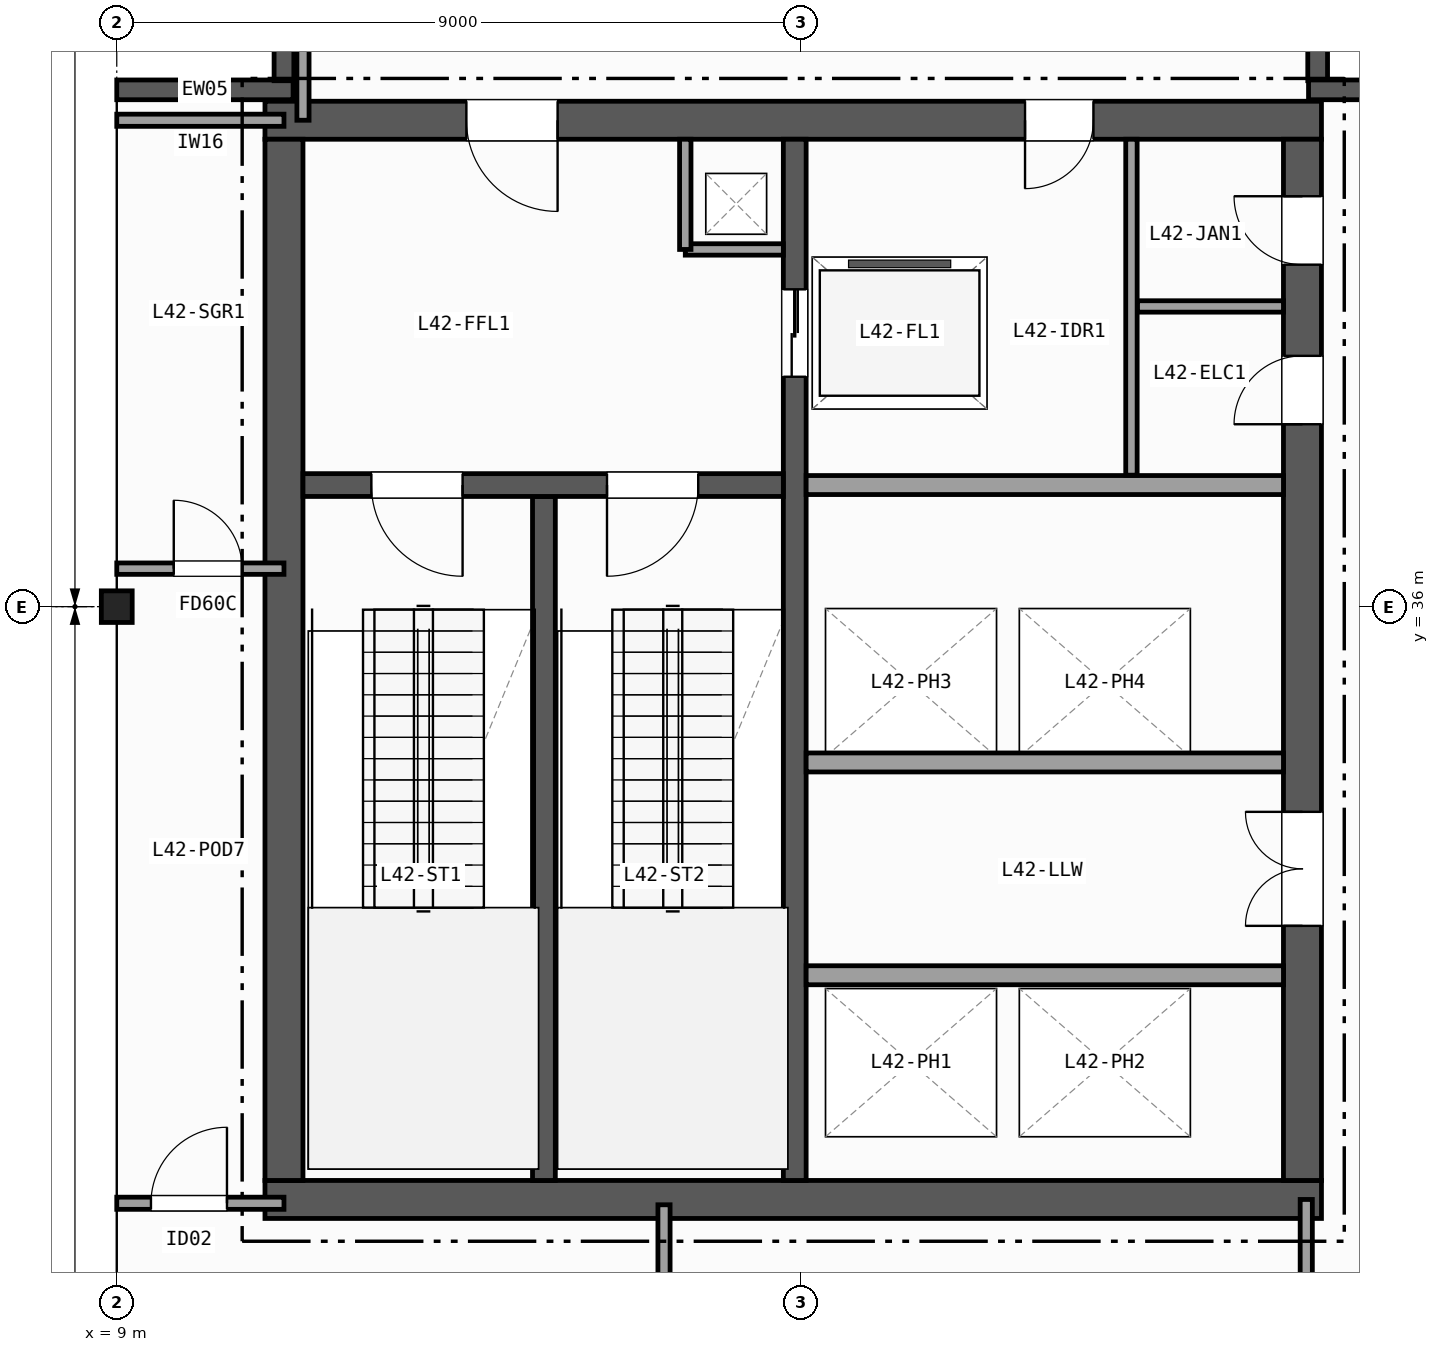
"""IFC4 building model, lengths in metres.
Left out: names, types, materials, properties, quantities, classifications, styles, units other than length and angle.
Written with IfcOpenShell. Run it as: python <this file> out.ifc"""

import sys

from ifc_helpers import new_model, si_unit, direction, frame, frame_2d, origin, origin_2d, place, context, subcontext, project, spatial, rectangle, i_section, extrude, element, fill, save


model = new_model("IFC4")
c1 = context("Model", 3, precision=1e-05, world=origin(), true_north=direction((0.0, 1.0)))
c2 = subcontext(c1, "Body", "Model", "MODEL_VIEW")
j1 = project(units=[si_unit("LENGTHUNIT", "METRE"), si_unit("PLANEANGLEUNIT", "RADIAN")], contexts=[c1])
p1 = place(None, origin())
s1 = spatial("IfcSite", under=j1, at=p1, CompositionType="ELEMENT")
p2 = place(p1, origin())
s2 = spatial("IfcBuilding", under=s1, at=p2, CompositionType="ELEMENT")
p3 = place(p2, frame((0.0, 0.0, 169.2)))
s3 = spatial("IfcBuildingStorey", under=s2, at=p3, CompositionType="ELEMENT", Elevation=169.2)
p4 = place(p3, frame((9.0, 36.0, 0.0), z_axis=(0.0, 0.0, 1.0), x_axis=(1.0, 0.0, 0.0)))
e1 = element("IfcColumn", 1, at=p4, inside=s3, PredefinedType="COLUMN", context=c2, shape_type="SweptSolid", body=[
    extrude(i_section(OverallWidth=0.406, OverallDepth=0.416, WebThickness=0.03, FlangeThickness=0.048, FilletRadius=0.015, at=origin_2d()), origin(), (0.0, 0.0, 1.0), 5.0),
])
p5 = place(p3, frame((9.0, 42.8, 0.0), z_axis=(0.0, 0.0, 1.0), x_axis=(1.0, 0.0, 0.0)))
e2 = element("IfcWall", 2, at=p5, inside=s3, PredefinedType="SOLIDWALL", context=c2, shape_type="SweptSolid", body=[
    extrude(rectangle(XDim=2.32, YDim=0.26, at=frame_2d((1.16, 0.0))), origin(), (0.0, 0.0, 1.0), 4.72),
])
for number, where, z_axis, x_axis in (
    (3, (11.2, 42.92, 0.0), (0.0, 0.0, 1.0), (0.0, 1.0, 0.0)),
    (4, (24.8, 45.0, 0.0), (0.0, 0.0, 1.0), (0.0, -1.0, 0.0)),
):
    element("IfcWall", number, at=place(p3, frame(where, z_axis=z_axis, x_axis=x_axis)), inside=s3, PredefinedType="SOLIDWALL", context=c2, shape_type="SweptSolid", body=[
        extrude(rectangle(XDim=2.08, YDim=0.26, at=frame_2d((1.04, 0.0))), origin(), (0.0, 0.0, 1.0), 4.72),
    ])
p6 = place(p3, frame((24.68, 42.8, 0.0), z_axis=(0.0, 0.0, 1.0), x_axis=(1.0, 0.0, 0.0)))
e5 = element("IfcWall", 5, at=p6, inside=s3, PredefinedType="SOLIDWALL", context=c2, shape_type="SweptSolid", body=[
    extrude(rectangle(XDim=2.32, YDim=0.26, at=frame_2d((1.16, 0.0))), origin(), (0.0, 0.0, 1.0), 4.72),
])
p7 = place(p3, frame((10.95, 28.2, 0.0), z_axis=(0.0, 0.0, 1.0), x_axis=(1.0, 0.0, 0.0)))
e6 = element("IfcWall", 6, at=p7, inside=s3, PredefinedType="SHEAR", context=c2, shape_type="SweptSolid", body=[
    extrude(rectangle(XDim=13.9, YDim=0.5, at=frame_2d((6.95, 0.0))), origin(), (0.0, 0.0, 1.0), 4.72),
])
p8 = place(p3, frame((24.85, 42.4, 0.0), z_axis=(0.0, 0.0, 1.0), x_axis=(-1.0, 0.0, 0.0)))
e7 = element("IfcWall", 7, at=p8, inside=s3, PredefinedType="SHEAR", context=c2, shape_type="SweptSolid", body=[
    extrude(rectangle(XDim=13.9, YDim=0.5, at=frame_2d((6.95, 0.0))), origin(), (0.0, 0.0, 1.0), 4.72),
])
p9 = place(p8, frame((10.05, 0.0, 0.0)))
e8 = element("IfcOpeningElement", 8, at=p9, cuts=e7, PredefinedType="OPENING", context=c2, shape_type="SweptSolid", body=[
    extrude(rectangle(XDim=1.2, YDim=2.15, at=frame_2d((0.6, 1.075))), frame((0.0, 0.26, 0.0), z_axis=(0.0, -1.0, 0.0), x_axis=(1.0, 0.0, 0.0)), (0.0, 0.0, 1.0), 0.52),
])
p10 = place(p8, frame((3.0, 0.0, 0.0)))
e9 = element("IfcOpeningElement", 9, at=p10, cuts=e7, PredefinedType="OPENING", context=c2, shape_type="SweptSolid", body=[
    extrude(rectangle(XDim=0.9, YDim=2.1, at=frame_2d((0.45, 1.05))), frame((0.0, 0.26, 0.0), z_axis=(0.0, -1.0, 0.0), x_axis=(1.0, 0.0, 0.0)), (0.0, 0.0, 1.0), 0.52),
])
p11 = place(p3, frame((11.2, 42.15, 0.0), z_axis=(0.0, 0.0, 1.0), x_axis=(0.0, -1.0, 0.0)))
e10 = element("IfcWall", 10, at=p11, inside=s3, PredefinedType="SHEAR", context=c2, shape_type="SweptSolid", body=[
    extrude(rectangle(XDim=13.7, YDim=0.5, at=frame_2d((6.85, 0.0))), origin(), (0.0, 0.0, 1.0), 4.72),
])
p12 = place(p3, frame((24.6, 28.45, 0.0), z_axis=(0.0, 0.0, 1.0), x_axis=(0.0, 1.0, 0.0)))
e11 = element("IfcWall", 11, at=p12, inside=s3, PredefinedType="SHEAR", context=c2, shape_type="SweptSolid", body=[
    extrude(rectangle(XDim=13.7, YDim=0.5, at=frame_2d((6.85, 0.0))), origin(), (0.0, 0.0, 1.0), 4.72),
])
p13 = place(p12, frame((3.35, 0.0, 0.0)))
e12 = element("IfcOpeningElement", 12, at=p13, cuts=e11, PredefinedType="OPENING", context=c2, shape_type="SweptSolid", body=[
    extrude(rectangle(XDim=1.5, YDim=2.2, at=frame_2d((0.75, 1.1))), frame((0.0, 0.26, 0.0), z_axis=(0.0, -1.0, 0.0), x_axis=(1.0, 0.0, 0.0)), (0.0, 0.0, 1.0), 0.52),
])
p14 = place(p12, frame((9.95, 0.0, 0.0)))
e13 = element("IfcOpeningElement", 13, at=p14, cuts=e11, PredefinedType="OPENING", context=c2, shape_type="SweptSolid", body=[
    extrude(rectangle(XDim=0.9, YDim=2.1, at=frame_2d((0.45, 1.05))), frame((0.0, 0.26, 0.0), z_axis=(0.0, -1.0, 0.0), x_axis=(1.0, 0.0, 0.0)), (0.0, 0.0, 1.0), 0.52),
])
p15 = place(p12, frame((12.05, 0.0, 0.0)))
e14 = element("IfcOpeningElement", 14, at=p15, cuts=e11, PredefinedType="OPENING", context=c2, shape_type="SweptSolid", body=[
    extrude(rectangle(XDim=0.9, YDim=2.1, at=frame_2d((0.45, 1.05))), frame((0.0, 0.26, 0.0), z_axis=(0.0, -1.0, 0.0), x_axis=(1.0, 0.0, 0.0)), (0.0, 0.0, 1.0), 0.52),
])
p16 = place(p3, frame((14.62, 28.45, 0.0), z_axis=(0.0, 0.0, 1.0), x_axis=(0.0, 1.0, 0.0)))
e15 = element("IfcWall", 15, at=p16, inside=s3, PredefinedType="SHEAR", context=c2, shape_type="SweptSolid", body=[
    extrude(rectangle(XDim=9.0, YDim=0.3, at=frame_2d((4.5, 0.0))), origin(), (0.0, 0.0, 1.0), 4.72),
])
p17 = place(p3, frame((17.92, 42.15, 0.0), z_axis=(0.0, 0.0, 1.0), x_axis=(0.0, -1.0, 0.0)))
e16 = element("IfcWall", 16, at=p17, inside=s3, PredefinedType="SHEAR", context=c2, shape_type="SweptSolid", body=[
    extrude(rectangle(XDim=13.7, YDim=0.3, at=frame_2d((6.85, 0.0))), origin(), (0.0, 0.0, 1.0), 4.72),
])
p18 = place(p17, frame((1.975, 0.0, 0.0)))
e17 = element("IfcOpeningElement", 17, at=p18, cuts=e16, PredefinedType="OPENING", context=c2, shape_type="SweptSolid", body=[
    extrude(rectangle(XDim=1.15, YDim=2.15, at=frame_2d((0.575, 1.075))), frame((0.0, 0.16, 0.0), z_axis=(0.0, -1.0, 0.0), x_axis=(1.0, 0.0, 0.0)), (0.0, 0.0, 1.0), 0.32),
])
p19 = place(p3, frame((17.77, 37.6, 0.0), z_axis=(0.0, 0.0, 1.0), x_axis=(-1.0, 0.0, 0.0)))
e18 = element("IfcWall", 18, at=p19, inside=s3, PredefinedType="SHEAR", context=c2, shape_type="SweptSolid", body=[
    extrude(rectangle(XDim=6.32, YDim=0.3, at=frame_2d((3.16, 0.0))), origin(), (0.0, 0.0, 1.0), 4.72),
])
p20 = place(p19, frame((4.22, 0.0, 0.0)))
e19 = element("IfcOpeningElement", 19, at=p20, cuts=e18, PredefinedType="OPENING", context=c2, shape_type="SweptSolid", body=[
    extrude(rectangle(XDim=1.2, YDim=2.15, at=frame_2d((0.6, 1.075))), frame((0.0, 0.16, 0.0), z_axis=(0.0, -1.0, 0.0), x_axis=(1.0, 0.0, 0.0)), (0.0, 0.0, 1.0), 0.32),
])
p21 = place(p19, frame((1.12, 0.0, 0.0)))
e20 = element("IfcOpeningElement", 20, at=p21, cuts=e18, PredefinedType="OPENING", context=c2, shape_type="SweptSolid", body=[
    extrude(rectangle(XDim=1.2, YDim=2.15, at=frame_2d((0.6, 1.075))), frame((0.0, 0.16, 0.0), z_axis=(0.0, -1.0, 0.0), x_axis=(1.0, 0.0, 0.0)), (0.0, 0.0, 1.0), 0.32),
])
p22 = place(p3, frame((16.48, 40.7, 0.0), z_axis=(0.0, 0.0, 1.0), x_axis=(1.0, 0.0, 0.0)))
e21 = element("IfcWall", 21, at=p22, inside=s3, PredefinedType="PARTITIONING", context=c2, shape_type="SweptSolid", body=[
    extrude(rectangle(XDim=1.29, YDim=0.15, at=frame_2d((0.645, 0.0))), origin(), (0.0, 0.0, 1.0), 4.72),
])
p23 = place(p3, frame((16.48, 40.7, 0.0), z_axis=(0.0, 0.0, 1.0), x_axis=(0.0, 1.0, 0.0)))
e22 = element("IfcWall", 22, at=p23, inside=s3, PredefinedType="PARTITIONING", context=c2, shape_type="SweptSolid", body=[
    extrude(rectangle(XDim=1.45, YDim=0.15, at=frame_2d((0.725, 0.0))), origin(), (0.0, 0.0, 1.0), 4.72),
])
for number, where, z_axis, x_axis in (
    (23, (18.07, 37.6, 0.0), (0.0, 0.0, 1.0), (1.0, 0.0, 0.0)),
    (24, (18.07, 31.15, 0.0), (0.0, 0.0, 1.0), (1.0, 0.0, 0.0)),
    (25, (24.35, 33.95, 0.0), (0.0, 0.0, 1.0), (-1.0, 0.0, 0.0)),
):
    element("IfcWall", number, at=place(p3, frame(where, z_axis=z_axis, x_axis=x_axis)), inside=s3, PredefinedType="PARTITIONING", context=c2, shape_type="SweptSolid", body=[
        extrude(rectangle(XDim=6.28, YDim=0.25, at=frame_2d((3.14, 0.0))), origin(), (0.0, 0.0, 1.0), 4.72),
    ])
p24 = place(p3, frame((22.35, 37.73, 0.0), z_axis=(0.0, 0.0, 1.0), x_axis=(0.0, 1.0, 0.0)))
e26 = element("IfcWall", 26, at=p24, inside=s3, PredefinedType="PARTITIONING", context=c2, shape_type="SweptSolid", body=[
    extrude(rectangle(XDim=4.42, YDim=0.15, at=frame_2d((2.21, 0.0))), origin(), (0.0, 0.0, 1.0), 4.72),
])
p25 = place(p3, frame((22.43, 39.95, 0.0), z_axis=(0.0, 0.0, 1.0), x_axis=(1.0, 0.0, 0.0)))
e27 = element("IfcWall", 27, at=p25, inside=s3, PredefinedType="PARTITIONING", context=c2, shape_type="SweptSolid", body=[
    extrude(rectangle(XDim=1.92, YDim=0.15, at=frame_2d((0.96, 0.0))), origin(), (0.0, 0.0, 1.0), 4.72),
])
p26 = place(p3, frame((9.0, 28.15, 0.0), z_axis=(0.0, 0.0, 1.0), x_axis=(1.0, 0.0, 0.0)))
e28 = element("IfcWall", 28, at=p26, inside=s3, PredefinedType="PARTITIONING", context=c2, shape_type="SweptSolid", body=[
    extrude(rectangle(XDim=2.2, YDim=0.16, at=frame_2d((1.1, 0.0))), origin(), (0.0, 0.0, 1.0), 3.934),
])
p27 = place(p26, frame((0.45, 0.0, 0.0)))
e29 = element("IfcOpeningElement", 29, at=p27, cuts=e28, PredefinedType="OPENING", context=c2, shape_type="SweptSolid", body=[
    extrude(rectangle(XDim=1.0, YDim=2.1, at=frame_2d((0.5, 1.05))), frame((0.0, 0.09, 0.0), z_axis=(0.0, -1.0, 0.0), x_axis=(1.0, 0.0, 0.0)), (0.0, 0.0, 1.0), 0.18),
])
p28 = place(p3, frame((9.0, 42.4, 0.0), z_axis=(0.0, 0.0, 1.0), x_axis=(1.0, 0.0, 0.0)))
e30 = element("IfcWall", 30, at=p28, inside=s3, PredefinedType="PARTITIONING", context=c2, shape_type="SweptSolid", body=[
    extrude(rectangle(XDim=2.2, YDim=0.16, at=frame_2d((1.1, 0.0))), origin(), (0.0, 0.0, 1.0), 4.72),
])
p29 = place(p3, frame((11.45, 42.4, 0.0), z_axis=(0.0, 0.0, 1.0), x_axis=(0.0, 1.0, 0.0)))
e31 = element("IfcWall", 31, at=p29, inside=s3, PredefinedType="PARTITIONING", context=c2, shape_type="SweptSolid", body=[
    extrude(rectangle(XDim=2.6, YDim=0.16, at=frame_2d((1.3, 0.0))), origin(), (0.0, 0.0, 1.0), 4.72),
])
p30 = place(p3, frame((9.0, 36.5, 0.0), z_axis=(0.0, 0.0, 1.0), x_axis=(1.0, 0.0, 0.0)))
e32 = element("IfcWall", 32, at=p30, inside=s3, PredefinedType="PARTITIONING", context=c2, shape_type="SweptSolid", body=[
    extrude(rectangle(XDim=2.2, YDim=0.15, at=frame_2d((1.1, 0.0))), origin(), (0.0, 0.0, 1.0), 4.72),
])
p31 = place(p30, frame((0.75, 0.0, 0.0)))
e33 = element("IfcOpeningElement", 33, at=p31, cuts=e32, PredefinedType="OPENING", context=c2, shape_type="SweptSolid", body=[
    extrude(rectangle(XDim=0.9, YDim=2.1, at=frame_2d((0.45, 1.05))), frame((0.0, 0.085, 0.0), z_axis=(0.0, -1.0, 0.0), x_axis=(1.0, 0.0, 0.0)), (0.0, 0.0, 1.0), 0.17),
])
p32 = place(p3, frame((24.65, 9.0, 0.0), z_axis=(0.0, 0.0, 1.0), x_axis=(0.0, 1.0, 0.0)))
e34 = element("IfcWall", 34, at=p32, inside=s3, PredefinedType="PARTITIONING", context=c2, shape_type="SweptSolid", body=[
    extrude(rectangle(XDim=19.2, YDim=0.16, at=frame_2d((9.6, 0.0))), origin(), (0.0, 0.0, 1.0), 3.934),
])
p33 = place(p32, frame((12.2, 0.0, 0.0)))
e35 = element("IfcOpeningElement", 35, at=p33, cuts=e34, PredefinedType="OPENING", context=c2, shape_type="SweptSolid", body=[
    extrude(rectangle(XDim=1.2, YDim=2.15, at=frame_2d((0.6, 1.075))), frame((0.0, 0.09, 0.0), z_axis=(0.0, -1.0, 0.0), x_axis=(1.0, 0.0, 0.0)), (0.0, 0.0, 1.0), 0.18),
])
p34 = place(p32, frame((4.2, 0.0, 0.0)))
e36 = element("IfcOpeningElement", 36, at=p34, cuts=e34, PredefinedType="OPENING", context=c2, shape_type="SweptSolid", body=[
    extrude(rectangle(XDim=0.86, YDim=2.05, at=frame_2d((0.43, 1.025))), frame((0.0, 0.09, 0.0), z_axis=(0.0, -1.0, 0.0), x_axis=(1.0, 0.0, 0.0)), (0.0, 0.0, 1.0), 0.18),
])
p35 = place(p3, frame((16.2, 18.0, 0.0), z_axis=(0.0, 0.0, 1.0), x_axis=(0.0, 1.0, 0.0)))
e37 = element("IfcWall", 37, at=p35, inside=s3, PredefinedType="PARTITIONING", context=c2, shape_type="SweptSolid", body=[
    extrude(rectangle(XDim=10.13, YDim=0.16, at=frame_2d((5.065, 0.0))), origin(), (0.0, 0.0, 1.0), 4.089),
])
p36 = place(p35, frame((2.5, 0.0, 0.0)))
e38 = element("IfcOpeningElement", 38, at=p36, cuts=e37, PredefinedType="OPENING", context=c2, shape_type="SweptSolid", body=[
    extrude(rectangle(XDim=0.95, YDim=2.1, at=frame_2d((0.475, 1.05))), frame((0.0, 0.09, 0.0), z_axis=(0.0, -1.0, 0.0), x_axis=(1.0, 0.0, 0.0)), (0.0, 0.0, 1.0), 0.18),
])
p37 = place(p20, origin())
e39 = element("IfcDoor", 39, at=p37, inside=s3, OperationType="SINGLE_SWING_LEFT", PredefinedType="DOOR", context=c2, shape_type="SweptSolid", body=[
    extrude(rectangle(XDim=1.2, YDim=2.15, at=frame_2d((0.6, 1.075))), frame((0.0, 0.025, 0.0), z_axis=(0.0, -1.0, 0.0), x_axis=(1.0, 0.0, 0.0)), (0.0, 0.0, 1.0), 0.05),
])
fill(e19, e39)
p38 = place(p21, origin())
e40 = element("IfcDoor", 40, at=p38, inside=s3, OperationType="SINGLE_SWING_RIGHT", PredefinedType="DOOR", context=c2, shape_type="SweptSolid", body=[
    extrude(rectangle(XDim=1.2, YDim=2.15, at=frame_2d((0.6, 1.075))), frame((0.0, 0.025, 0.0), z_axis=(0.0, -1.0, 0.0), x_axis=(1.0, 0.0, 0.0)), (0.0, 0.0, 1.0), 0.05),
])
fill(e20, e40)
p39 = place(p13, origin())
e41 = element("IfcDoor", 41, at=p39, inside=s3, OperationType="DOUBLE_DOOR_SINGLE_SWING", PredefinedType="DOOR", context=c2, shape_type="SweptSolid", body=[
    extrude(rectangle(XDim=1.5, YDim=2.2, at=frame_2d((0.75, 1.1))), frame((0.0, 0.025, 0.0), z_axis=(0.0, -1.0, 0.0), x_axis=(1.0, 0.0, 0.0)), (0.0, 0.0, 1.0), 0.05),
])
fill(e12, e41)
p40 = place(p9, origin())
e42 = element("IfcDoor", 42, at=p40, inside=s3, OperationType="SINGLE_SWING_LEFT", PredefinedType="DOOR", context=c2, shape_type="SweptSolid", body=[
    extrude(rectangle(XDim=1.2, YDim=2.15, at=frame_2d((0.6, 1.075))), frame((0.0, 0.025, 0.0), z_axis=(0.0, -1.0, 0.0), x_axis=(1.0, 0.0, 0.0)), (0.0, 0.0, 1.0), 0.05),
])
fill(e8, e42)
p41 = place(p14, origin())
e43 = element("IfcDoor", 43, at=p41, inside=s3, OperationType="SINGLE_SWING_LEFT", PredefinedType="DOOR", context=c2, shape_type="SweptSolid", body=[
    extrude(rectangle(XDim=0.9, YDim=2.1, at=frame_2d((0.45, 1.05))), frame((0.0, 0.025, 0.0), z_axis=(0.0, -1.0, 0.0), x_axis=(1.0, 0.0, 0.0)), (0.0, 0.0, 1.0), 0.05),
])
fill(e13, e43)
p42 = place(p10, origin())
e44 = element("IfcDoor", 44, at=p42, inside=s3, OperationType="SINGLE_SWING_RIGHT", PredefinedType="DOOR", context=c2, shape_type="SweptSolid", body=[
    extrude(rectangle(XDim=0.9, YDim=2.1, at=frame_2d((0.45, 1.05))), frame((0.0, 0.025, 0.0), z_axis=(0.0, -1.0, 0.0), x_axis=(1.0, 0.0, 0.0)), (0.0, 0.0, 1.0), 0.05),
])
fill(e9, e44)
p43 = place(p15, origin())
e45 = element("IfcDoor", 45, at=p43, inside=s3, OperationType="SINGLE_SWING_RIGHT", PredefinedType="DOOR", context=c2, shape_type="SweptSolid", body=[
    extrude(rectangle(XDim=0.9, YDim=2.1, at=frame_2d((0.45, 1.05))), frame((0.0, 0.025, 0.0), z_axis=(0.0, -1.0, 0.0), x_axis=(1.0, 0.0, 0.0)), (0.0, 0.0, 1.0), 0.05),
])
fill(e14, e45)
p44 = place(p18, origin())
e46 = element("IfcDoor", 46, at=p44, inside=s3, OperationType="DOUBLE_DOOR_SLIDING", PredefinedType="DOOR", context=c2, shape_type="SweptSolid", body=[
    extrude(rectangle(XDim=1.15, YDim=2.15, at=frame_2d((0.575, 1.075))), frame((0.0, 0.025, 0.0), z_axis=(0.0, -1.0, 0.0), x_axis=(1.0, 0.0, 0.0)), (0.0, 0.0, 1.0), 0.05),
])
fill(e17, e46)
p45 = place(p27, origin())
e47 = element("IfcDoor", 47, at=p45, inside=s3, OperationType="SINGLE_SWING_RIGHT", PredefinedType="DOOR", context=c2, shape_type="SweptSolid", body=[
    extrude(rectangle(XDim=1.0, YDim=2.1, at=frame_2d((0.5, 1.05))), frame((0.0, 0.025, 0.0), z_axis=(0.0, -1.0, 0.0), x_axis=(1.0, 0.0, 0.0)), (0.0, 0.0, 1.0), 0.05),
])
fill(e29, e47)
p46 = place(p31, origin())
e48 = element("IfcDoor", 48, at=p46, inside=s3, OperationType="SINGLE_SWING_LEFT", PredefinedType="DOOR", context=c2, shape_type="SweptSolid", body=[
    extrude(rectangle(XDim=0.9, YDim=2.1, at=frame_2d((0.45, 1.05))), frame((0.0, 0.025, 0.0), z_axis=(0.0, -1.0, 0.0), x_axis=(1.0, 0.0, 0.0)), (0.0, 0.0, 1.0), 0.05),
])
fill(e33, e48)
save(model, sys.argv[1])
